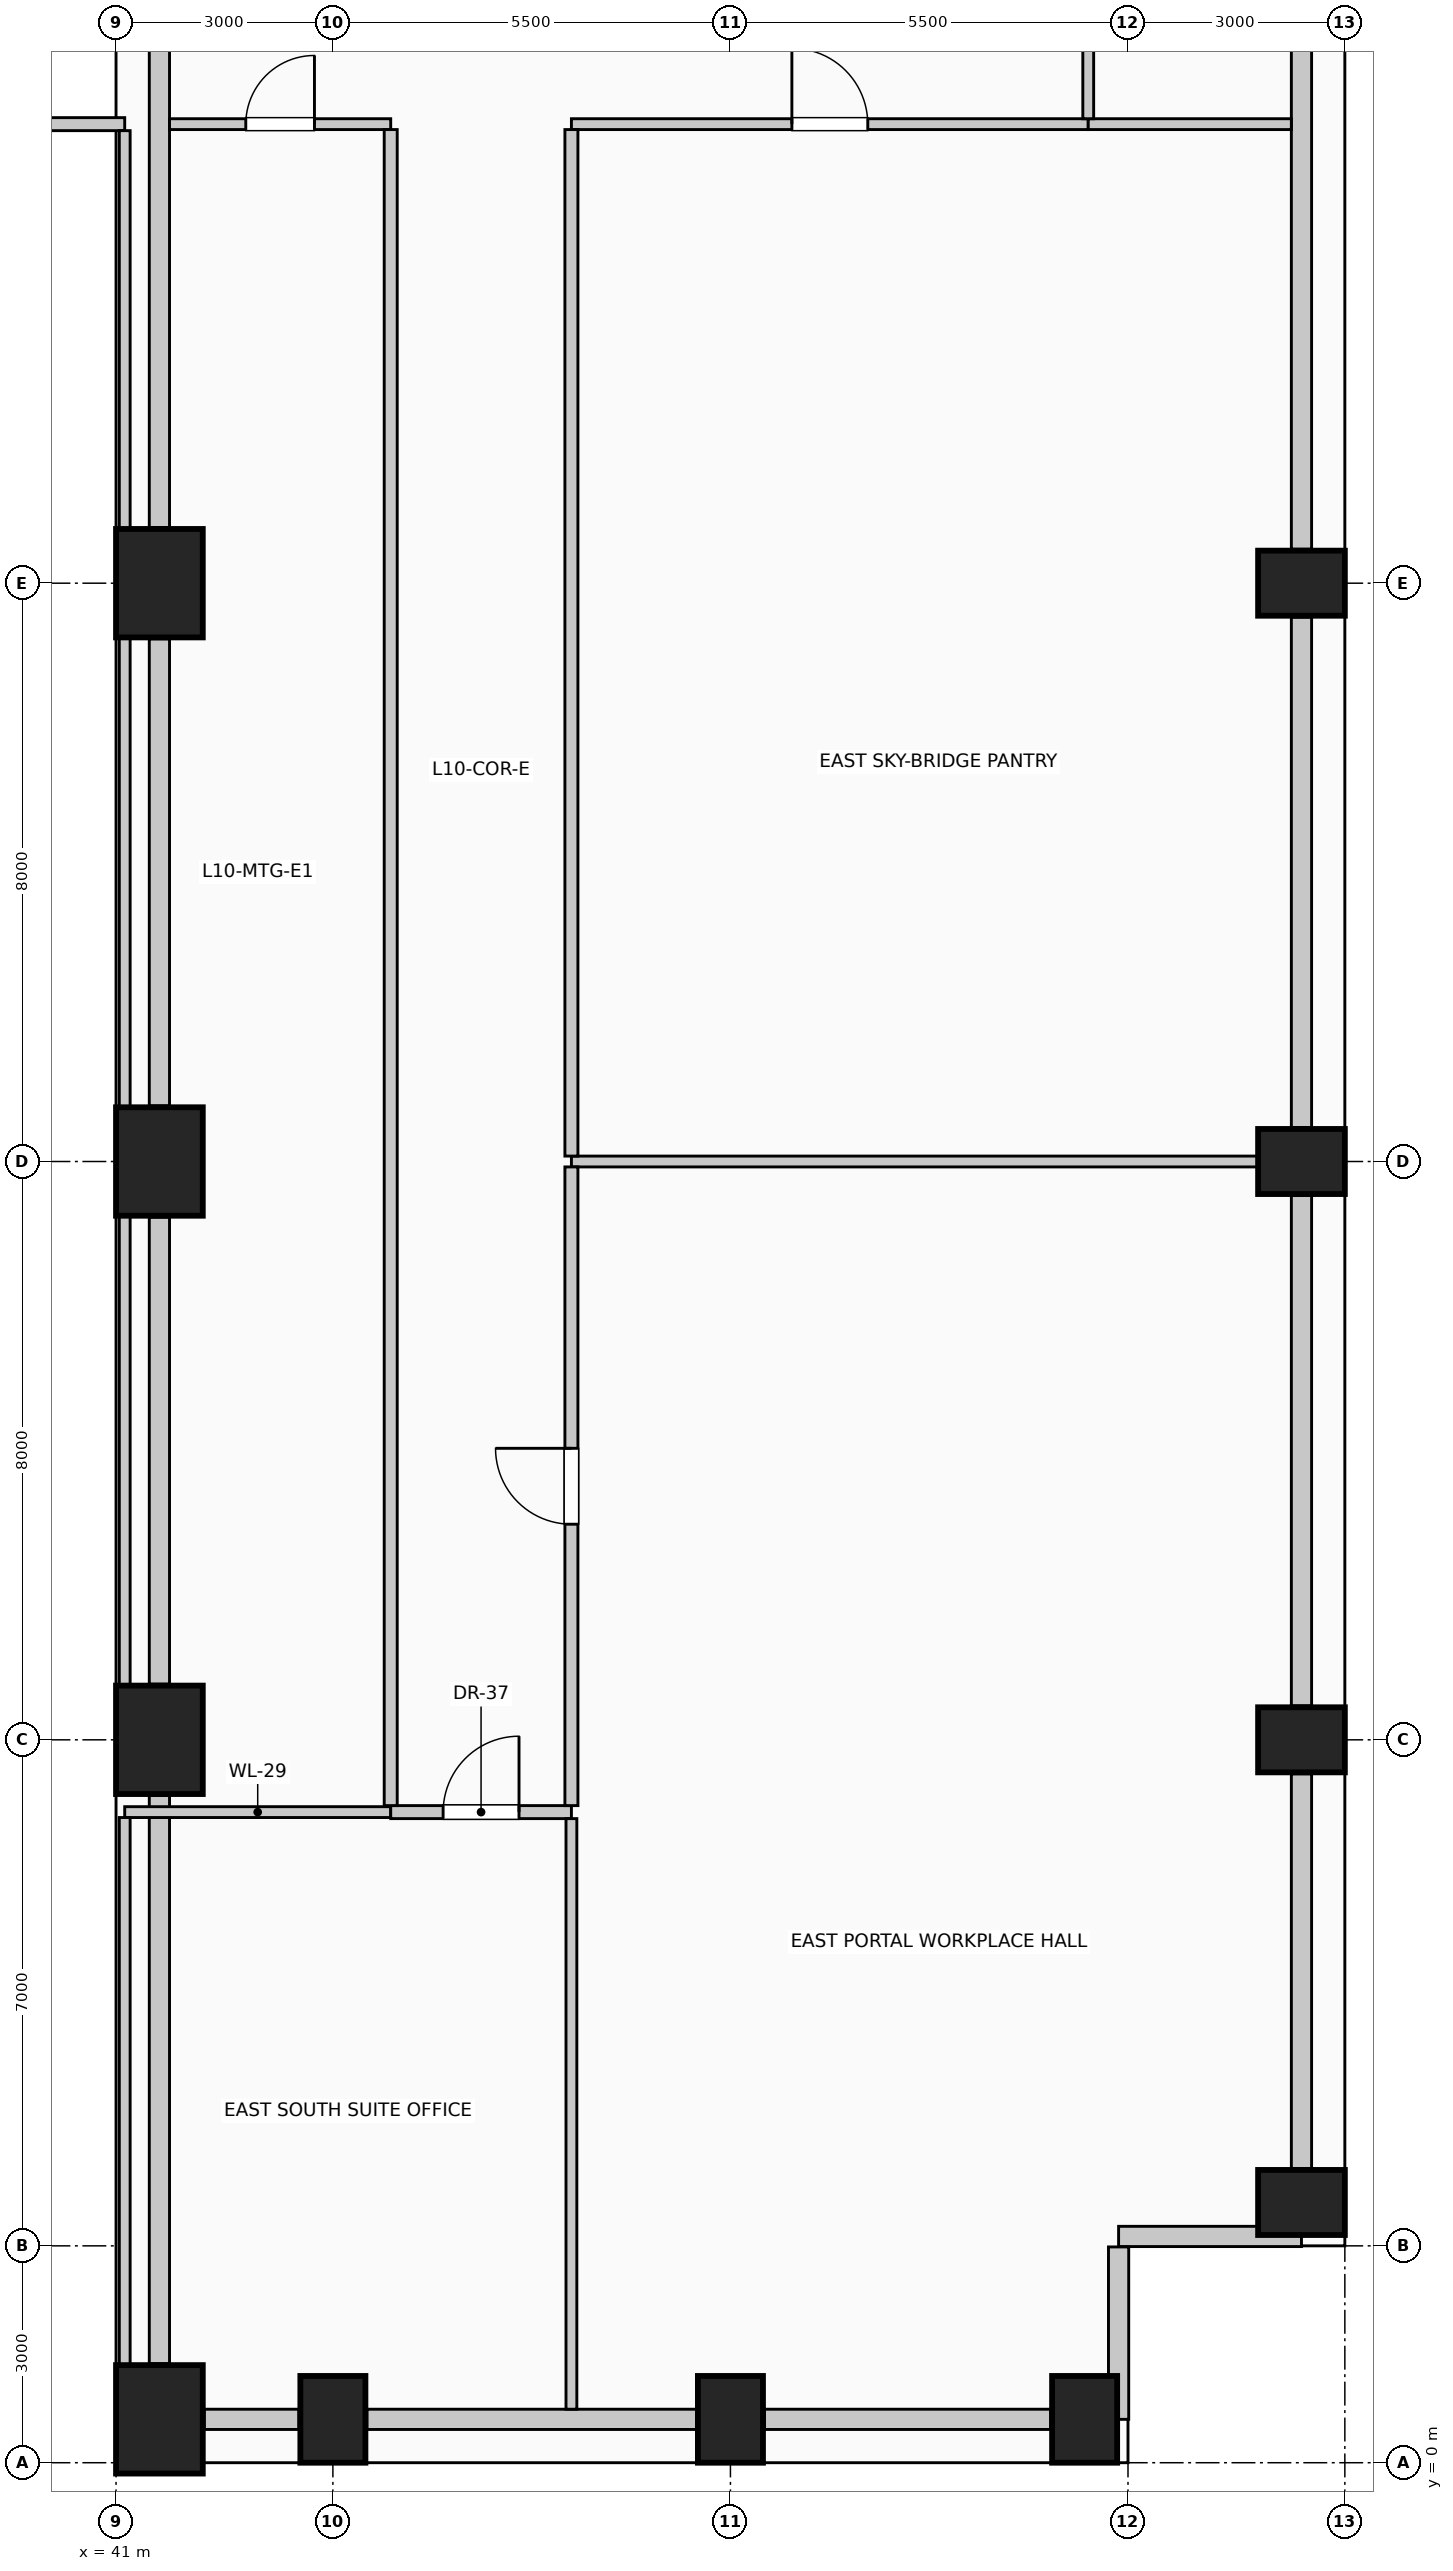
"""IFC4 building model, lengths in metres.
Left out: names, types, materials, properties, quantities, classifications, styles, units other than length and angle.
Written with IfcOpenShell. Run it as: python <this file> out.ifc"""

import sys

from ifc_helpers import new_model, si_unit, direction, frame, frame_2d, origin, origin_2d, place, context, subcontext, project, spatial, rectangle, extrude, element, fill, save


model = new_model("IFC4")
c1 = context("Model", 3, precision=1e-05, world=origin(), true_north=direction((0.0, 1.0)))
c2 = subcontext(c1, "Body", "Model", "MODEL_VIEW")
j1 = project(units=[si_unit("LENGTHUNIT", "METRE"), si_unit("PLANEANGLEUNIT", "RADIAN")], contexts=[c1])
p1 = place(None, origin())
s1 = spatial("IfcSite", under=j1, at=p1, CompositionType="ELEMENT")
p2 = place(p1, origin())
s2 = spatial("IfcBuilding", under=s1, at=p2, CompositionType="ELEMENT")
p3 = place(p2, frame((0.0, 0.0, 42.6)))
s3 = spatial("IfcBuildingStorey", under=s2, at=p3, CompositionType="ELEMENT", Elevation=42.6)
p4 = place(p3, frame((41.6, 0.6, 0.0), z_axis=(0.0, 0.0, 1.0), x_axis=(1.0, 0.0, 0.0)))
e1 = element("IfcColumn", 1, at=p4, inside=s3, PredefinedType="COLUMN", context=c2, shape_type="SweptSolid", body=[
    extrude(rectangle(XDim=1.2, YDim=1.5, at=origin_2d()), origin(), (0.0, 0.0, 1.0), 4.0),
])
for number, where, z_axis, x_axis in (
    (2, (44.0, 0.6, 0.0), (0.0, 0.0, 1.0), (1.0, 0.0, 0.0)),
    (3, (49.5, 0.6, 0.0), (0.0, 0.0, 1.0), (1.0, 0.0, 0.0)),
    (4, (54.4, 0.6, 0.0), (0.0, 0.0, 1.0), (1.0, 0.0, 0.0)),
    (5, (57.4, 3.6, 0.0), (0.0, 0.0, 1.0), (0.0, 1.0, 0.0)),
    (6, (57.4, 10.0, 0.0), (0.0, 0.0, 1.0), (0.0, 1.0, 0.0)),
    (7, (57.4, 18.0, 0.0), (0.0, 0.0, 1.0), (0.0, 1.0, 0.0)),
    (8, (57.4, 26.0, 0.0), (0.0, 0.0, 1.0), (0.0, 1.0, 0.0)),
):
    element("IfcColumn", number, at=place(p3, frame(where, z_axis=z_axis, x_axis=x_axis)), inside=s3, PredefinedType="COLUMN", context=c2, shape_type="SweptSolid", body=[
        extrude(rectangle(XDim=0.9, YDim=1.2, at=origin_2d()), origin(), (0.0, 0.0, 1.0), 4.0),
    ])
for number, where, z_axis, x_axis in (
    (9, (41.6, 10.0, 0.0), (0.0, 0.0, 1.0), (1.0, 0.0, 0.0)),
    (10, (41.6, 18.0, 0.0), (0.0, 0.0, 1.0), (1.0, 0.0, 0.0)),
    (11, (41.6, 26.0, 0.0), (0.0, 0.0, 1.0), (1.0, 0.0, 0.0)),
):
    element("IfcColumn", number, at=place(p3, frame(where, z_axis=z_axis, x_axis=x_axis)), inside=s3, PredefinedType="COLUMN", context=c2, shape_type="SweptSolid", body=[
        extrude(rectangle(XDim=1.2, YDim=1.5, at=origin_2d()), origin(), (0.0, 0.0, 1.0), 4.0),
    ])
p5 = place(p3, frame((43.53, 0.6, 0.0), z_axis=(0.0, 0.0, 1.0), x_axis=(-1.0, 0.0, 0.0)))
e12 = element("IfcWall", 12, at=p5, inside=s3, PredefinedType="SOLIDWALL", context=c2, shape_type="SweptSolid", body=[
    extrude(rectangle(XDim=1.31, YDim=0.28, at=frame_2d((0.655, 0.0))), origin(), (0.0, 0.0, 1.0), 2.85),
])
p6 = place(p3, frame((49.03, 0.6, 0.0), z_axis=(0.0, 0.0, 1.0), x_axis=(-1.0, 0.0, 0.0)))
e13 = element("IfcWall", 13, at=p6, inside=s3, PredefinedType="SOLIDWALL", context=c2, shape_type="SweptSolid", body=[
    extrude(rectangle(XDim=4.56, YDim=0.28, at=frame_2d((2.28, 0.0))), origin(), (0.0, 0.0, 1.0), 2.85),
])
p7 = place(p3, frame((53.93, 0.6, 0.0), z_axis=(0.0, 0.0, 1.0), x_axis=(-1.0, 0.0, 0.0)))
e14 = element("IfcWall", 14, at=p7, inside=s3, PredefinedType="SOLIDWALL", context=c2, shape_type="SweptSolid", body=[
    extrude(rectangle(XDim=3.96, YDim=0.28, at=frame_2d((1.98, 0.0))), origin(), (0.0, 0.0, 1.0), 2.85),
])
p8 = place(p3, frame((57.4, 9.53, 0.0), z_axis=(0.0, 0.0, 1.0), x_axis=(0.0, -1.0, 0.0)))
e15 = element("IfcWall", 15, at=p8, inside=s3, PredefinedType="SOLIDWALL", context=c2, shape_type="SweptSolid", body=[
    extrude(rectangle(XDim=5.46, YDim=0.28, at=frame_2d((2.73, 0.0))), origin(), (0.0, 0.0, 1.0), 2.85),
])
for number, where, z_axis, x_axis in (
    (16, (57.4, 17.53, 0.0), (0.0, 0.0, 1.0), (0.0, -1.0, 0.0)),
    (17, (57.4, 25.53, 0.0), (0.0, 0.0, 1.0), (0.0, -1.0, 0.0)),
    (18, (57.4, 33.53, 0.0), (0.0, 0.0, 1.0), (0.0, -1.0, 0.0)),
):
    element("IfcWall", number, at=place(p3, frame(where, z_axis=z_axis, x_axis=x_axis)), inside=s3, PredefinedType="SOLIDWALL", context=c2, shape_type="SweptSolid", body=[
        extrude(rectangle(XDim=7.06, YDim=0.28, at=frame_2d((3.53, 0.0))), origin(), (0.0, 0.0, 1.0), 2.85),
    ])
p9 = place(p3, frame((57.4, 3.13, 0.0), z_axis=(0.0, 0.0, 1.0), x_axis=(-1.0, 0.0, 0.0)))
e19 = element("IfcWall", 19, at=p9, inside=s3, PredefinedType="SOLIDWALL", context=c2, shape_type="SweptSolid", body=[
    extrude(rectangle(XDim=2.53, YDim=0.28, at=frame_2d((1.265, 0.0))), origin(), (0.0, 0.0, 1.0), 3.7),
])
p10 = place(p3, frame((54.87, 2.985, 0.0), z_axis=(0.0, 0.0, 1.0), x_axis=(0.0, -1.0, 0.0)))
e20 = element("IfcWall", 20, at=p10, inside=s3, PredefinedType="SOLIDWALL", context=c2, shape_type="SweptSolid", body=[
    extrude(rectangle(XDim=2.385, YDim=0.28, at=frame_2d((1.192, 0.0))), origin(), (0.0, 0.0, 1.0), 3.7),
])
p11 = place(p3, frame((41.6, 1.37, 0.0), z_axis=(0.0, 0.0, 1.0), x_axis=(0.0, 1.0, 0.0)))
e21 = element("IfcWall", 21, at=p11, inside=s3, PredefinedType="SOLIDWALL", context=c2, shape_type="SweptSolid", body=[
    extrude(rectangle(XDim=7.86, YDim=0.28, at=frame_2d((3.93, 0.0))), origin(), (0.0, 0.0, 1.0), 3.0),
])
for number, where, z_axis, x_axis in (
    (22, (41.6, 10.77, 0.0), (0.0, 0.0, 1.0), (0.0, 1.0, 0.0)),
    (23, (41.6, 18.77, 0.0), (0.0, 0.0, 1.0), (0.0, 1.0, 0.0)),
):
    element("IfcWall", number, at=place(p3, frame(where, z_axis=z_axis, x_axis=x_axis)), inside=s3, PredefinedType="SOLIDWALL", context=c2, shape_type="SweptSolid", body=[
        extrude(rectangle(XDim=6.46, YDim=0.28, at=frame_2d((3.23, 0.0))), origin(), (0.0, 0.0, 1.0), 3.0),
    ])
p12 = place(p3, frame((41.6, 26.77, 0.0), z_axis=(0.0, 0.0, 1.0), x_axis=(0.0, 1.0, 0.0)))
e24 = element("IfcWall", 24, at=p12, inside=s3, PredefinedType="SOLIDWALL", context=c2, shape_type="SweptSolid", body=[
    extrude(rectangle(XDim=6.71, YDim=0.28, at=frame_2d((3.355, 0.0))), origin(), (0.0, 0.0, 1.0), 3.0),
])
p13 = place(p3, frame((41.12, 9.0, 0.0), z_axis=(0.0, 0.0, 1.0), x_axis=(1.0, 0.0, 0.0)))
e25 = element("IfcWall", 25, at=p13, inside=s3, PredefinedType="PARTITIONING", context=c2, shape_type="SweptSolid", body=[
    extrude(rectangle(XDim=3.68, YDim=0.15, at=frame_2d((1.84, 0.0))), origin(), (0.0, 0.0, 1.0), 3.7),
])
p14 = place(p3, frame((44.8, 9.0, 0.0), z_axis=(0.0, 0.0, 1.0), x_axis=(1.0, 0.0, 0.0)))
e26 = element("IfcWall", 26, at=p14, inside=s3, PredefinedType="PARTITIONING", context=c2, shape_type="SweptSolid", body=[
    extrude(rectangle(XDim=2.5, YDim=0.18, at=frame_2d((1.25, 0.0))), origin(), (0.0, 0.0, 1.0), 3.7),
])
p15 = place(p14, frame((0.725, 0.0, 0.0)))
e27 = element("IfcOpeningElement", 27, at=p15, cuts=e26, PredefinedType="OPENING", context=c2, shape_type="SweptSolid", body=[
    extrude(rectangle(XDim=1.05, YDim=2.15, at=frame_2d((0.525, 1.075))), frame((0.0, 0.1, 0.0), z_axis=(0.0, -1.0, 0.0), x_axis=(1.0, 0.0, 0.0)), (0.0, 0.0, 1.0), 0.2),
])
p16 = place(p3, frame((47.3, 18.0, 0.0), z_axis=(0.0, 0.0, 1.0), x_axis=(1.0, 0.0, 0.0)))
e28 = element("IfcWall", 28, at=p16, inside=s3, PredefinedType="PARTITIONING", context=c2, shape_type="SweptSolid", body=[
    extrude(rectangle(XDim=9.5, YDim=0.15, at=frame_2d((4.75, 0.0))), origin(), (0.0, 0.0, 1.0), 2.785),
])
p17 = place(p3, frame((39.1, 32.35, 0.0), z_axis=(0.0, 0.0, 1.0), x_axis=(1.0, 0.0, 0.0)))
e29 = element("IfcWall", 29, at=p17, inside=s3, PredefinedType="PARTITIONING", context=c2, shape_type="SweptSolid", body=[
    extrude(rectangle(XDim=2.02, YDim=0.18, at=frame_2d((1.01, 0.0))), origin(), (0.0, 0.0, 1.0), 3.7),
])
p18 = place(p3, frame((41.74, 32.35, 0.0), z_axis=(0.0, 0.0, 1.0), x_axis=(1.0, 0.0, 0.0)))
e30 = element("IfcWall", 30, at=p18, inside=s3, PredefinedType="PARTITIONING", context=c2, shape_type="SweptSolid", body=[
    extrude(rectangle(XDim=3.06, YDim=0.15, at=frame_2d((1.53, 0.0))), origin(), (0.0, 0.0, 1.0), 3.7),
])
p19 = place(p18, frame((1.055, 0.0, 0.0)))
e31 = element("IfcOpeningElement", 31, at=p19, cuts=e30, PredefinedType="OPENING", context=c2, shape_type="SweptSolid", body=[
    extrude(rectangle(XDim=0.95, YDim=2.15, at=frame_2d((0.475, 1.075))), frame((0.0, 0.085, 0.0), z_axis=(0.0, -1.0, 0.0), x_axis=(1.0, 0.0, 0.0)), (0.0, 0.0, 1.0), 0.17),
])
p20 = place(p3, frame((47.3, 32.35, 0.0), z_axis=(0.0, 0.0, 1.0), x_axis=(1.0, 0.0, 0.0)))
e32 = element("IfcWall", 32, at=p20, inside=s3, PredefinedType="PARTITIONING", context=c2, shape_type="SweptSolid", body=[
    extrude(rectangle(XDim=7.15, YDim=0.15, at=frame_2d((3.575, 0.0))), origin(), (0.0, 0.0, 1.0), 3.7),
])
p21 = place(p20, frame((3.05, 0.0, 0.0)))
e33 = element("IfcOpeningElement", 33, at=p21, cuts=e32, PredefinedType="OPENING", context=c2, shape_type="SweptSolid", body=[
    extrude(rectangle(XDim=1.05, YDim=2.15, at=frame_2d((0.525, 1.075))), frame((0.0, 0.085, 0.0), z_axis=(0.0, -1.0, 0.0), x_axis=(1.0, 0.0, 0.0)), (0.0, 0.0, 1.0), 0.17),
])
p22 = place(p3, frame((54.45, 32.35, 0.0), z_axis=(0.0, 0.0, 1.0), x_axis=(1.0, 0.0, 0.0)))
e34 = element("IfcWall", 34, at=p22, inside=s3, PredefinedType="PARTITIONING", context=c2, shape_type="SweptSolid", body=[
    extrude(rectangle(XDim=2.81, YDim=0.15, at=frame_2d((1.405, 0.0))), origin(), (0.0, 0.0, 1.0), 3.7),
])
p23 = place(p3, frame((41.12, 1.35, 0.0), z_axis=(0.0, 0.0, 1.0), x_axis=(0.0, 1.0, 0.0)))
e35 = element("IfcWall", 35, at=p23, inside=s3, PredefinedType="PARTITIONING", context=c2, shape_type="SweptSolid", body=[
    extrude(rectangle(XDim=7.575, YDim=0.15, at=frame_2d((3.788, 0.0))), origin(), (0.0, 0.0, 1.0), 3.7),
])
for number, where, z_axis, x_axis in (
    (36, (41.12, 10.75, 0.0), (0.0, 0.0, 1.0), (0.0, 1.0, 0.0)),
    (37, (41.12, 18.75, 0.0), (0.0, 0.0, 1.0), (0.0, 1.0, 0.0)),
):
    element("IfcWall", number, at=place(p3, frame(where, z_axis=z_axis, x_axis=x_axis)), inside=s3, PredefinedType="PARTITIONING", context=c2, shape_type="SweptSolid", body=[
        extrude(rectangle(XDim=6.5, YDim=0.15, at=frame_2d((3.25, 0.0))), origin(), (0.0, 0.0, 1.0), 3.7),
    ])
p24 = place(p3, frame((41.12, 26.75, 0.0), z_axis=(0.0, 0.0, 1.0), x_axis=(0.0, 1.0, 0.0)))
e38 = element("IfcWall", 38, at=p24, inside=s3, PredefinedType="PARTITIONING", context=c2, shape_type="SweptSolid", body=[
    extrude(rectangle(XDim=5.51, YDim=0.15, at=frame_2d((2.755, 0.0))), origin(), (0.0, 0.0, 1.0), 3.7),
])
p25 = place(p3, frame((44.8, 9.09, 0.0), z_axis=(0.0, 0.0, 1.0), x_axis=(0.0, 1.0, 0.0)))
e39 = element("IfcWall", 39, at=p25, inside=s3, PredefinedType="PARTITIONING", context=c2, shape_type="SweptSolid", body=[
    extrude(rectangle(XDim=23.185, YDim=0.18, at=frame_2d((11.592, 0.0))), origin(), (0.0, 0.0, 1.0), 3.7),
])
p26 = place(p3, frame((47.3, 0.74, 0.0), z_axis=(0.0, 0.0, 1.0), x_axis=(0.0, 1.0, 0.0)))
e40 = element("IfcWall", 40, at=p26, inside=s3, PredefinedType="PARTITIONING", context=c2, shape_type="SweptSolid", body=[
    extrude(rectangle(XDim=8.17, YDim=0.15, at=frame_2d((4.085, 0.0))), origin(), (0.0, 0.0, 1.0), 3.7),
])
p27 = place(p3, frame((47.3, 9.09, 0.0), z_axis=(0.0, 0.0, 1.0), x_axis=(0.0, 1.0, 0.0)))
e41 = element("IfcWall", 41, at=p27, inside=s3, PredefinedType="PARTITIONING", context=c2, shape_type="SweptSolid", body=[
    extrude(rectangle(XDim=8.835, YDim=0.18, at=frame_2d((4.417, 0.0))), origin(), (0.0, 0.0, 1.0), 3.7),
])
p28 = place(p27, frame((3.893, 0.0, 0.0)))
e42 = element("IfcOpeningElement", 42, at=p28, cuts=e41, PredefinedType="OPENING", context=c2, shape_type="SweptSolid", body=[
    extrude(rectangle(XDim=1.05, YDim=2.15, at=frame_2d((0.525, 1.075))), frame((0.0, 0.1, 0.0), z_axis=(0.0, -1.0, 0.0), x_axis=(1.0, 0.0, 0.0)), (0.0, 0.0, 1.0), 0.2),
])
p29 = place(p3, frame((47.3, 18.075, 0.0), z_axis=(0.0, 0.0, 1.0), x_axis=(0.0, 1.0, 0.0)))
e43 = element("IfcWall", 43, at=p29, inside=s3, PredefinedType="PARTITIONING", context=c2, shape_type="SweptSolid", body=[
    extrude(rectangle(XDim=14.2, YDim=0.18, at=frame_2d((7.1, 0.0))), origin(), (0.0, 0.0, 1.0), 3.7),
])
p30 = place(p3, frame((54.45, 32.425, 0.0), z_axis=(0.0, 0.0, 1.0), x_axis=(0.0, 1.0, 0.0)))
e44 = element("IfcWall", 44, at=p30, inside=s3, PredefinedType="PARTITIONING", context=c2, shape_type="SweptSolid", body=[
    extrude(rectangle(XDim=1.725, YDim=0.15, at=frame_2d((0.862, 0.0))), origin(), (0.0, 0.0, 1.0), 3.7),
])
p31 = place(p15, origin())
e45 = element("IfcDoor", 45, at=p31, inside=s3, OperationType="SINGLE_SWING_RIGHT", PredefinedType="DOOR", context=c2, shape_type="SweptSolid", body=[
    extrude(rectangle(XDim=1.05, YDim=2.15, at=frame_2d((0.525, 1.075))), frame((0.0, 0.025, 0.0), z_axis=(0.0, -1.0, 0.0), x_axis=(1.0, 0.0, 0.0)), (0.0, 0.0, 1.0), 0.05),
])
fill(e27, e45)
p32 = place(p19, origin())
e46 = element("IfcDoor", 46, at=p32, inside=s3, OperationType="SINGLE_SWING_RIGHT", PredefinedType="DOOR", context=c2, shape_type="SweptSolid", body=[
    extrude(rectangle(XDim=0.95, YDim=2.15, at=frame_2d((0.475, 1.075))), frame((0.0, 0.025, 0.0), z_axis=(0.0, -1.0, 0.0), x_axis=(1.0, 0.0, 0.0)), (0.0, 0.0, 1.0), 0.05),
])
fill(e31, e46)
p33 = place(p21, origin())
e47 = element("IfcDoor", 47, at=p33, inside=s3, OperationType="SINGLE_SWING_LEFT", PredefinedType="DOOR", context=c2, shape_type="SweptSolid", body=[
    extrude(rectangle(XDim=1.05, YDim=2.15, at=frame_2d((0.525, 1.075))), frame((0.0, 0.025, 0.0), z_axis=(0.0, -1.0, 0.0), x_axis=(1.0, 0.0, 0.0)), (0.0, 0.0, 1.0), 0.05),
])
fill(e33, e47)
p34 = place(p28, origin())
e48 = element("IfcDoor", 48, at=p34, inside=s3, OperationType="SINGLE_SWING_RIGHT", PredefinedType="DOOR", context=c2, shape_type="SweptSolid", body=[
    extrude(rectangle(XDim=1.05, YDim=2.15, at=frame_2d((0.525, 1.075))), frame((0.0, 0.025, 0.0), z_axis=(0.0, -1.0, 0.0), x_axis=(1.0, 0.0, 0.0)), (0.0, 0.0, 1.0), 0.05),
])
fill(e42, e48)
save(model, sys.argv[1])
